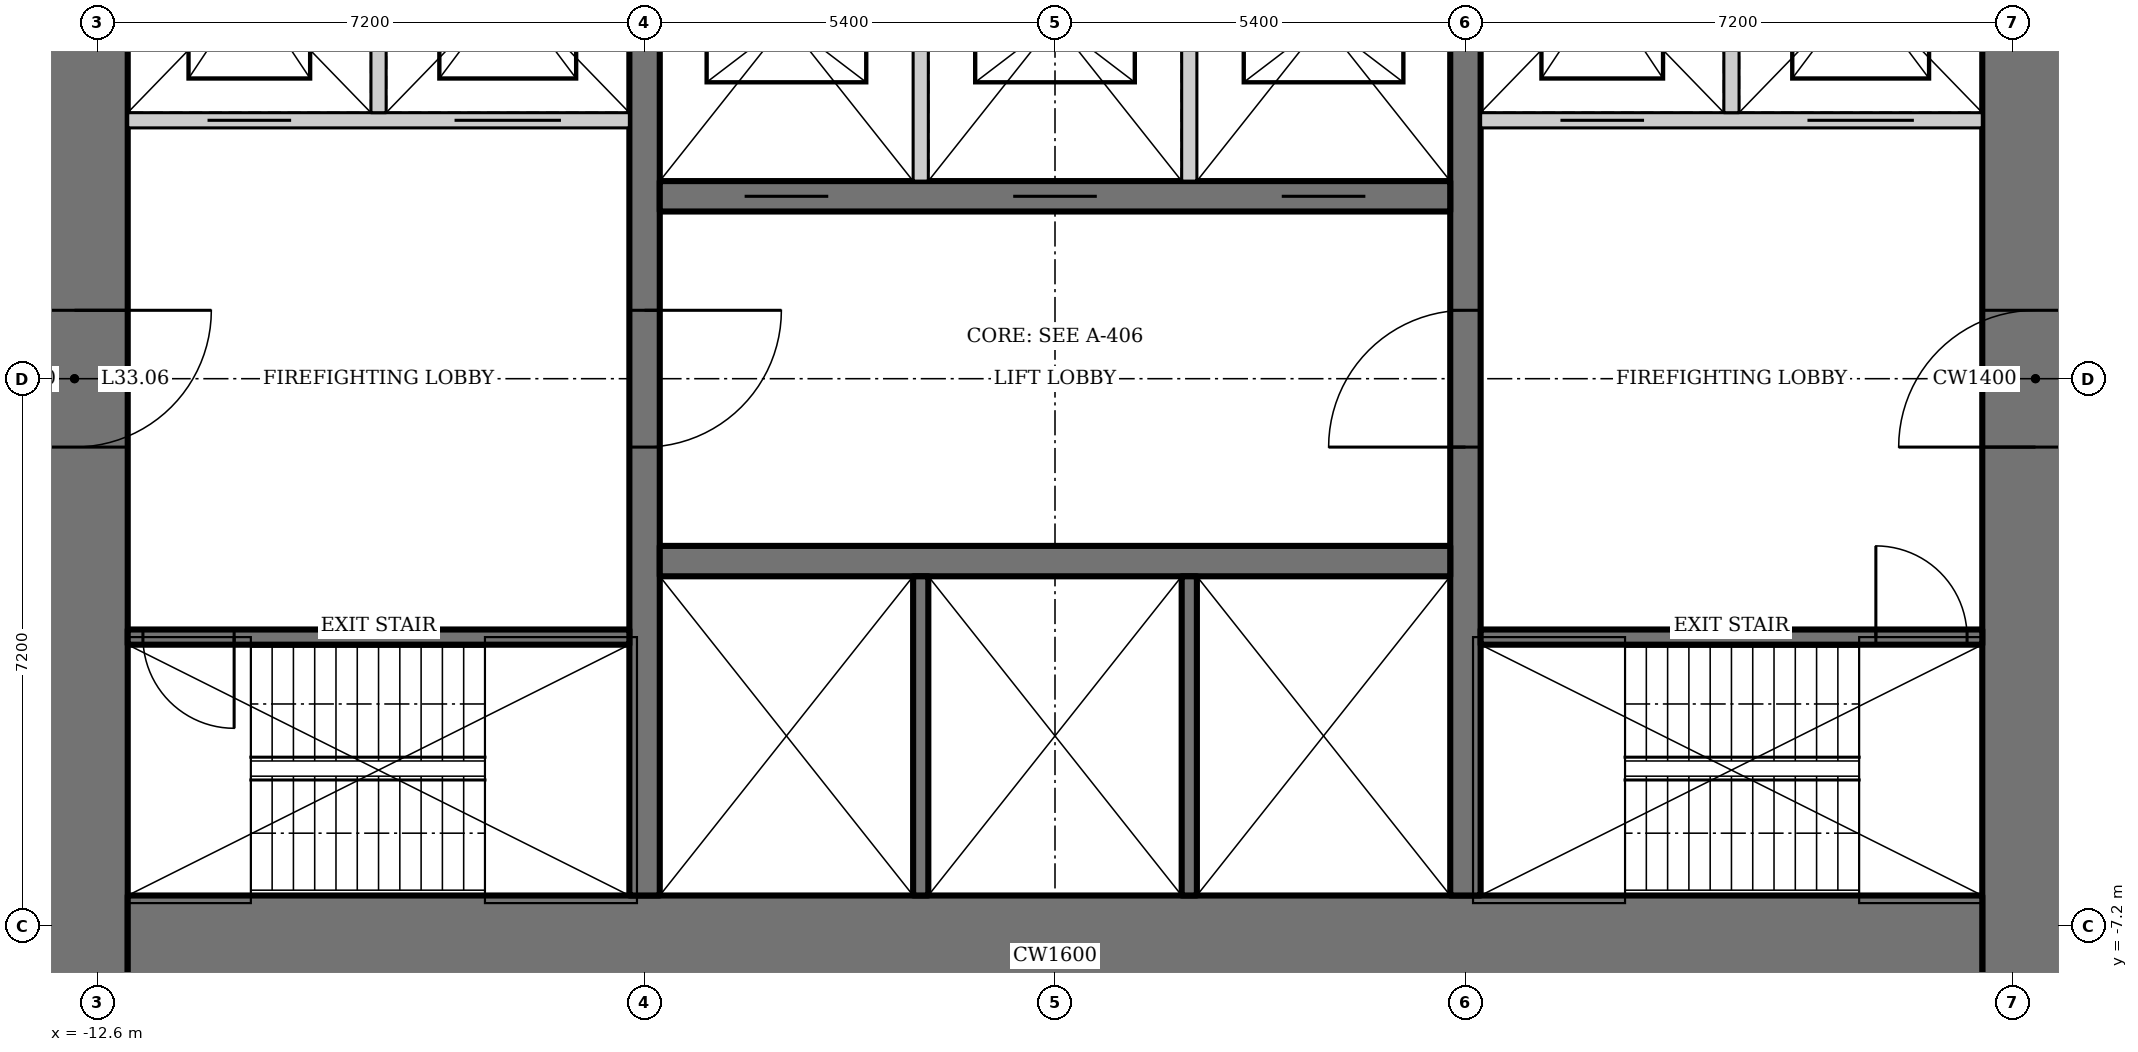
"""IFC4 building model, lengths in metres.
Left out: names, types, materials, properties, quantities, classifications, styles, units other than length and angle.
Written with IfcOpenShell. Run it as: python <this file> out.ifc"""

import sys

from ifc_helpers import new_model, si_unit, direction, frame, frame_2d, origin, place, context, subcontext, project, spatial, rectangle, extrude, element, fill, save


model = new_model("IFC4")
c1 = context("Model", 3, precision=1e-05, world=origin(), true_north=direction((0.0, 1.0)))
c2 = subcontext(c1, "Body", "Model", "MODEL_VIEW")
j1 = project(units=[si_unit("LENGTHUNIT", "METRE"), si_unit("PLANEANGLEUNIT", "RADIAN")], contexts=[c1])
p1 = place(None, origin())
s1 = spatial("IfcSite", under=j1, at=p1, CompositionType="ELEMENT")
p2 = place(p1, origin())
s2 = spatial("IfcBuilding", under=s1, at=p2, CompositionType="ELEMENT")
p3 = place(p2, frame((0.0, 0.0, 142.6)))
s3 = spatial("IfcBuildingStorey", under=s2, at=p3, CompositionType="ELEMENT", Elevation=142.6)
p4 = place(p3, frame((12.9, -13.0, 0.0), z_axis=(0.0, 0.0, 1.0), x_axis=(0.0, 1.0, 0.0)))
e1 = element("IfcWall", 1, at=p4, inside=s3, PredefinedType="SHEAR", context=c2, shape_type="SweptSolid", body=[
    extrude(rectangle(XDim=26.0, YDim=1.4, at=frame_2d((13.0, 0.0))), origin(), (0.0, 0.0, 1.0), 4.2),
])
p5 = place(p4, frame((12.1, 0.0, 0.0)))
e2 = element("IfcOpeningElement", 2, at=p5, cuts=e1, PredefinedType="OPENING", context=c2, shape_type="SweptSolid", body=[
    extrude(rectangle(XDim=1.8, YDim=2.1, at=frame_2d((0.9, 1.05))), frame((0.0, 0.71, 0.0), z_axis=(0.0, -1.0, 0.0), x_axis=(1.0, 0.0, 0.0)), (0.0, 0.0, 1.0), 1.42),
])
p6 = place(p3, frame((-12.9, 13.0, 0.0), z_axis=(0.0, 0.0, 1.0), x_axis=(0.0, -1.0, 0.0)))
e3 = element("IfcWall", 3, at=p6, inside=s3, PredefinedType="SHEAR", context=c2, shape_type="SweptSolid", body=[
    extrude(rectangle(XDim=26.0, YDim=1.4, at=frame_2d((13.0, 0.0))), origin(), (0.0, 0.0, 1.0), 4.2),
])
p7 = place(p6, frame((12.1, 0.0, 0.0)))
e4 = element("IfcOpeningElement", 4, at=p7, cuts=e3, PredefinedType="OPENING", context=c2, shape_type="SweptSolid", body=[
    extrude(rectangle(XDim=1.8, YDim=2.1, at=frame_2d((0.9, 1.05))), frame((0.0, 0.71, 0.0), z_axis=(0.0, -1.0, 0.0), x_axis=(1.0, 0.0, 0.0)), (0.0, 0.0, 1.0), 1.42),
])
p8 = place(p3, frame((-12.2, -7.6, 0.0), z_axis=(0.0, 0.0, 1.0), x_axis=(1.0, 0.0, 0.0)))
e5 = element("IfcWall", 5, at=p8, inside=s3, PredefinedType="SHEAR", context=c2, shape_type="SweptSolid", body=[
    extrude(rectangle(XDim=24.4, YDim=1.6, at=frame_2d((12.2, 0.0))), origin(), (0.0, 0.0, 1.0), 4.2),
])
p9 = place(p3, frame((5.4, -6.8, 0.0), z_axis=(0.0, 0.0, 1.0), x_axis=(0.0, 1.0, 0.0)))
e6 = element("IfcWall", 6, at=p9, inside=s3, PredefinedType="SHEAR", context=c2, shape_type="SweptSolid", body=[
    extrude(rectangle(XDim=13.6, YDim=0.4, at=frame_2d((6.8, 0.0))), origin(), (0.0, 0.0, 1.0), 4.2),
])
p10 = place(p9, frame((5.9, 0.0, 0.0)))
e7 = element("IfcOpeningElement", 7, at=p10, cuts=e6, PredefinedType="OPENING", context=c2, shape_type="SweptSolid", body=[
    extrude(rectangle(XDim=1.8, YDim=2.1, at=frame_2d((0.9, 1.05))), frame((0.0, 0.21, 0.0), z_axis=(0.0, -1.0, 0.0), x_axis=(1.0, 0.0, 0.0)), (0.0, 0.0, 1.0), 0.42),
])
p11 = place(p3, frame((-5.4, 6.8, 0.0), z_axis=(0.0, 0.0, 1.0), x_axis=(0.0, -1.0, 0.0)))
e8 = element("IfcWall", 8, at=p11, inside=s3, PredefinedType="SHEAR", context=c2, shape_type="SweptSolid", body=[
    extrude(rectangle(XDim=13.6, YDim=0.4, at=frame_2d((6.8, 0.0))), origin(), (0.0, 0.0, 1.0), 4.2),
])
p12 = place(p11, frame((5.9, 0.0, 0.0)))
e9 = element("IfcOpeningElement", 9, at=p12, cuts=e8, PredefinedType="OPENING", context=c2, shape_type="SweptSolid", body=[
    extrude(rectangle(XDim=1.8, YDim=2.1, at=frame_2d((0.9, 1.05))), frame((0.0, 0.21, 0.0), z_axis=(0.0, -1.0, 0.0), x_axis=(1.0, 0.0, 0.0)), (0.0, 0.0, 1.0), 0.42),
])
p13 = place(p3, frame((-5.2, -2.4, 0.0), z_axis=(0.0, 0.0, 1.0), x_axis=(1.0, 0.0, 0.0)))
e10 = element("IfcWall", 10, at=p13, inside=s3, PredefinedType="SHEAR", context=c2, shape_type="SweptSolid", body=[
    extrude(rectangle(XDim=10.4, YDim=0.4, at=frame_2d((5.2, 0.0))), origin(), (0.0, 0.0, 1.0), 4.2),
])
for number, where, z_axis, x_axis in (
    (11, (-1.767, -2.6, 0.0), (0.0, 0.0, 1.0), (0.0, -1.0, 0.0)),
    (12, (1.767, -2.6, 0.0), (0.0, 0.0, 1.0), (0.0, -1.0, 0.0)),
):
    element("IfcWall", number, at=place(p3, frame(where, z_axis=z_axis, x_axis=x_axis)), inside=s3, PredefinedType="SOLIDWALL", context=c2, shape_type="SweptSolid", body=[
        extrude(rectangle(XDim=4.2, YDim=0.2, at=frame_2d((2.1, 0.0))), origin(), (0.0, 0.0, 1.0), 4.2),
    ])
p14 = place(p3, frame((5.2, 2.4, 0.0), z_axis=(0.0, 0.0, 1.0), x_axis=(-1.0, 0.0, 0.0)))
e13 = element("IfcWall", 13, at=p14, inside=s3, PredefinedType="SHEAR", context=c2, shape_type="SweptSolid", body=[
    extrude(rectangle(XDim=10.4, YDim=0.4, at=frame_2d((5.2, 0.0))), origin(), (0.0, 0.0, 1.0), 4.2),
])
p15 = place(p14, frame((8.183, 0.0, 0.0)))
e14 = element("IfcOpeningElement", 14, at=p15, cuts=e13, PredefinedType="OPENING", context=c2, shape_type="SweptSolid", body=[
    extrude(rectangle(XDim=1.1, YDim=2.2, at=frame_2d((0.55, 1.1))), frame((0.0, 0.21, 0.0), z_axis=(0.0, -1.0, 0.0), x_axis=(1.0, 0.0, 0.0)), (0.0, 0.0, 1.0), 0.42),
])
p16 = place(p14, frame((4.65, 0.0, 0.0)))
e15 = element("IfcOpeningElement", 15, at=p16, cuts=e13, PredefinedType="OPENING", context=c2, shape_type="SweptSolid", body=[
    extrude(rectangle(XDim=1.1, YDim=2.2, at=frame_2d((0.55, 1.1))), frame((0.0, 0.21, 0.0), z_axis=(0.0, -1.0, 0.0), x_axis=(1.0, 0.0, 0.0)), (0.0, 0.0, 1.0), 0.42),
])
p17 = place(p14, frame((1.117, 0.0, 0.0)))
e16 = element("IfcOpeningElement", 16, at=p17, cuts=e13, PredefinedType="OPENING", context=c2, shape_type="SweptSolid", body=[
    extrude(rectangle(XDim=1.1, YDim=2.2, at=frame_2d((0.55, 1.1))), frame((0.0, 0.21, 0.0), z_axis=(0.0, -1.0, 0.0), x_axis=(1.0, 0.0, 0.0)), (0.0, 0.0, 1.0), 0.42),
])
for number, where, z_axis, x_axis in (
    (17, (-1.767, 2.6, 0.0), (0.0, 0.0, 1.0), (0.0, 1.0, 0.0)),
    (18, (1.767, 2.6, 0.0), (0.0, 0.0, 1.0), (0.0, 1.0, 0.0)),
):
    element("IfcWall", number, at=place(p3, frame(where, z_axis=z_axis, x_axis=x_axis)), inside=s3, PredefinedType="SOLIDWALL", context=c2, shape_type="SweptSolid", body=[
        extrude(rectangle(XDim=4.2, YDim=0.2, at=frame_2d((2.1, 0.0))), origin(), (0.0, 0.0, 1.0), 4.2),
    ])
p18 = place(p3, frame((5.6, -3.4, 0.0), z_axis=(0.0, 0.0, 1.0), x_axis=(1.0, 0.0, 0.0)))
e19 = element("IfcWall", 19, at=p18, inside=s3, PredefinedType="SHEAR", context=c2, shape_type="SweptSolid", body=[
    extrude(rectangle(XDim=6.6, YDim=0.2, at=frame_2d((3.3, 0.0))), origin(), (0.0, 0.0, 1.0), 4.2),
])
p19 = place(p18, frame((5.2, 0.0, 0.0)))
e20 = element("IfcOpeningElement", 20, at=p19, cuts=e19, PredefinedType="OPENING", context=c2, shape_type="SweptSolid", body=[
    extrude(rectangle(XDim=1.2, YDim=2.1, at=frame_2d((0.6, 1.05))), frame((0.0, 0.11, 0.0), z_axis=(0.0, -1.0, 0.0), x_axis=(1.0, 0.0, 0.0)), (0.0, 0.0, 1.0), 0.22),
])
p20 = place(p3, frame((12.2, 3.4, 0.0), z_axis=(0.0, 0.0, 1.0), x_axis=(-1.0, 0.0, 0.0)))
e21 = element("IfcWall", 21, at=p20, inside=s3, PredefinedType="SOLIDWALL", context=c2, shape_type="SweptSolid", body=[
    extrude(rectangle(XDim=6.6, YDim=0.2, at=frame_2d((3.3, 0.0))), origin(), (0.0, 0.0, 1.0), 4.2),
])
p21 = place(p20, frame((4.45, 0.0, 0.0)))
e22 = element("IfcOpeningElement", 22, at=p21, cuts=e21, PredefinedType="OPENING", context=c2, shape_type="SweptSolid", body=[
    extrude(rectangle(XDim=1.1, YDim=2.2, at=frame_2d((0.55, 1.1))), frame((0.0, 0.11, 0.0), z_axis=(0.0, -1.0, 0.0), x_axis=(1.0, 0.0, 0.0)), (0.0, 0.0, 1.0), 0.22),
])
p22 = place(p20, frame((0.9, 0.0, 0.0)))
e23 = element("IfcOpeningElement", 23, at=p22, cuts=e21, PredefinedType="OPENING", context=c2, shape_type="SweptSolid", body=[
    extrude(rectangle(XDim=1.4, YDim=2.2, at=frame_2d((0.7, 1.1))), frame((0.0, 0.11, 0.0), z_axis=(0.0, -1.0, 0.0), x_axis=(1.0, 0.0, 0.0)), (0.0, 0.0, 1.0), 0.22),
])
p23 = place(p3, frame((8.9, 3.5, 0.0), z_axis=(0.0, 0.0, 1.0), x_axis=(0.0, 1.0, 0.0)))
e24 = element("IfcWall", 24, at=p23, inside=s3, PredefinedType="SOLIDWALL", context=c2, shape_type="SweptSolid", body=[
    extrude(rectangle(XDim=3.3, YDim=0.2, at=frame_2d((1.65, 0.0))), origin(), (0.0, 0.0, 1.0), 4.2),
])
p24 = place(p3, frame((-5.6, -3.4, 0.0), z_axis=(0.0, 0.0, 1.0), x_axis=(-1.0, 0.0, 0.0)))
e25 = element("IfcWall", 25, at=p24, inside=s3, PredefinedType="SHEAR", context=c2, shape_type="SweptSolid", body=[
    extrude(rectangle(XDim=6.6, YDim=0.2, at=frame_2d((3.3, 0.0))), origin(), (0.0, 0.0, 1.0), 4.2),
])
p25 = place(p24, frame((5.2, 0.0, 0.0)))
e26 = element("IfcOpeningElement", 26, at=p25, cuts=e25, PredefinedType="OPENING", context=c2, shape_type="SweptSolid", body=[
    extrude(rectangle(XDim=1.2, YDim=2.1, at=frame_2d((0.6, 1.05))), frame((0.0, 0.11, 0.0), z_axis=(0.0, -1.0, 0.0), x_axis=(1.0, 0.0, 0.0)), (0.0, 0.0, 1.0), 0.22),
])
p26 = place(p3, frame((-12.2, 3.4, 0.0), z_axis=(0.0, 0.0, 1.0), x_axis=(1.0, 0.0, 0.0)))
e27 = element("IfcWall", 27, at=p26, inside=s3, PredefinedType="SOLIDWALL", context=c2, shape_type="SweptSolid", body=[
    extrude(rectangle(XDim=6.6, YDim=0.2, at=frame_2d((3.3, 0.0))), origin(), (0.0, 0.0, 1.0), 4.2),
])
p27 = place(p26, frame((1.05, 0.0, 0.0)))
e28 = element("IfcOpeningElement", 28, at=p27, cuts=e27, PredefinedType="OPENING", context=c2, shape_type="SweptSolid", body=[
    extrude(rectangle(XDim=1.1, YDim=2.2, at=frame_2d((0.55, 1.1))), frame((0.0, 0.11, 0.0), z_axis=(0.0, -1.0, 0.0), x_axis=(1.0, 0.0, 0.0)), (0.0, 0.0, 1.0), 0.22),
])
p28 = place(p26, frame((4.3, 0.0, 0.0)))
e29 = element("IfcOpeningElement", 29, at=p28, cuts=e27, PredefinedType="OPENING", context=c2, shape_type="SweptSolid", body=[
    extrude(rectangle(XDim=1.4, YDim=2.2, at=frame_2d((0.7, 1.1))), frame((0.0, 0.11, 0.0), z_axis=(0.0, -1.0, 0.0), x_axis=(1.0, 0.0, 0.0)), (0.0, 0.0, 1.0), 0.22),
])
p29 = place(p3, frame((-8.9, 3.5, 0.0), z_axis=(0.0, 0.0, 1.0), x_axis=(0.0, 1.0, 0.0)))
e30 = element("IfcWall", 30, at=p29, inside=s3, PredefinedType="SOLIDWALL", context=c2, shape_type="SweptSolid", body=[
    extrude(rectangle(XDim=3.3, YDim=0.2, at=frame_2d((1.65, 0.0))), origin(), (0.0, 0.0, 1.0), 4.2),
])
p30 = place(p10, origin())
e31 = element("IfcDoor", 31, at=p30, inside=s3, OperationType="DOUBLE_DOOR_DOUBLE_SWING", PredefinedType="DOOR", context=c2, shape_type="SweptSolid", body=[
    extrude(rectangle(XDim=1.8, YDim=2.1, at=frame_2d((0.9, 1.05))), frame((0.0, 0.025, 0.0), z_axis=(0.0, -1.0, 0.0), x_axis=(1.0, 0.0, 0.0)), (0.0, 0.0, 1.0), 0.05),
])
fill(e7, e31)
p31 = place(p12, origin())
e32 = element("IfcDoor", 32, at=p31, inside=s3, OperationType="DOUBLE_DOOR_DOUBLE_SWING", PredefinedType="DOOR", context=c2, shape_type="SweptSolid", body=[
    extrude(rectangle(XDim=1.8, YDim=2.1, at=frame_2d((0.9, 1.05))), frame((0.0, 0.025, 0.0), z_axis=(0.0, -1.0, 0.0), x_axis=(1.0, 0.0, 0.0)), (0.0, 0.0, 1.0), 0.05),
])
fill(e9, e32)
p32 = place(p19, origin())
e33 = element("IfcDoor", 33, at=p32, inside=s3, OperationType="SINGLE_SWING_RIGHT", PredefinedType="DOOR", context=c2, shape_type="SweptSolid", body=[
    extrude(rectangle(XDim=1.2, YDim=2.1, at=frame_2d((0.6, 1.05))), frame((0.0, 0.025, 0.0), z_axis=(0.0, -1.0, 0.0), x_axis=(1.0, 0.0, 0.0)), (0.0, 0.0, 1.0), 0.05),
])
fill(e20, e33)
p33 = place(p25, origin())
e34 = element("IfcDoor", 34, at=p33, inside=s3, OperationType="SINGLE_SWING_RIGHT", PredefinedType="DOOR", context=c2, shape_type="SweptSolid", body=[
    extrude(rectangle(XDim=1.2, YDim=2.1, at=frame_2d((0.6, 1.05))), frame((0.0, 0.025, 0.0), z_axis=(0.0, -1.0, 0.0), x_axis=(1.0, 0.0, 0.0)), (0.0, 0.0, 1.0), 0.05),
])
fill(e26, e34)
p34 = place(p5, origin())
e35 = element("IfcDoor", 35, at=p34, inside=s3, OperationType="DOUBLE_DOOR_DOUBLE_SWING", PredefinedType="DOOR", context=c2, shape_type="SweptSolid", body=[
    extrude(rectangle(XDim=1.8, YDim=2.1, at=frame_2d((0.9, 1.05))), frame((0.0, 0.025, 0.0), z_axis=(0.0, -1.0, 0.0), x_axis=(1.0, 0.0, 0.0)), (0.0, 0.0, 1.0), 0.05),
])
fill(e2, e35)
p35 = place(p7, origin())
e36 = element("IfcDoor", 36, at=p35, inside=s3, OperationType="DOUBLE_DOOR_DOUBLE_SWING", PredefinedType="DOOR", context=c2, shape_type="SweptSolid", body=[
    extrude(rectangle(XDim=1.8, YDim=2.1, at=frame_2d((0.9, 1.05))), frame((0.0, 0.025, 0.0), z_axis=(0.0, -1.0, 0.0), x_axis=(1.0, 0.0, 0.0)), (0.0, 0.0, 1.0), 0.05),
])
fill(e4, e36)
p36 = place(p15, origin())
e37 = element("IfcDoor", 37, at=p36, inside=s3, OperationType="DOUBLE_DOOR_SLIDING", PredefinedType="DOOR", context=c2, shape_type="SweptSolid", body=[
    extrude(rectangle(XDim=1.1, YDim=2.2, at=frame_2d((0.55, 1.1))), frame((0.0, 0.025, 0.0), z_axis=(0.0, -1.0, 0.0), x_axis=(1.0, 0.0, 0.0)), (0.0, 0.0, 1.0), 0.05),
])
fill(e14, e37)
p37 = place(p16, origin())
e38 = element("IfcDoor", 38, at=p37, inside=s3, OperationType="DOUBLE_DOOR_SLIDING", PredefinedType="DOOR", context=c2, shape_type="SweptSolid", body=[
    extrude(rectangle(XDim=1.1, YDim=2.2, at=frame_2d((0.55, 1.1))), frame((0.0, 0.025, 0.0), z_axis=(0.0, -1.0, 0.0), x_axis=(1.0, 0.0, 0.0)), (0.0, 0.0, 1.0), 0.05),
])
fill(e15, e38)
p38 = place(p17, origin())
e39 = element("IfcDoor", 39, at=p38, inside=s3, OperationType="DOUBLE_DOOR_SLIDING", PredefinedType="DOOR", context=c2, shape_type="SweptSolid", body=[
    extrude(rectangle(XDim=1.1, YDim=2.2, at=frame_2d((0.55, 1.1))), frame((0.0, 0.025, 0.0), z_axis=(0.0, -1.0, 0.0), x_axis=(1.0, 0.0, 0.0)), (0.0, 0.0, 1.0), 0.05),
])
fill(e16, e39)
p39 = place(p27, origin())
e40 = element("IfcDoor", 40, at=p39, inside=s3, OperationType="DOUBLE_DOOR_SLIDING", PredefinedType="DOOR", context=c2, shape_type="SweptSolid", body=[
    extrude(rectangle(XDim=1.1, YDim=2.2, at=frame_2d((0.55, 1.1))), frame((0.0, 0.025, 0.0), z_axis=(0.0, -1.0, 0.0), x_axis=(1.0, 0.0, 0.0)), (0.0, 0.0, 1.0), 0.05),
])
fill(e28, e40)
p40 = place(p28, origin())
e41 = element("IfcDoor", 41, at=p40, inside=s3, OperationType="DOUBLE_DOOR_SLIDING", PredefinedType="DOOR", context=c2, shape_type="SweptSolid", body=[
    extrude(rectangle(XDim=1.4, YDim=2.2, at=frame_2d((0.7, 1.1))), frame((0.0, 0.025, 0.0), z_axis=(0.0, -1.0, 0.0), x_axis=(1.0, 0.0, 0.0)), (0.0, 0.0, 1.0), 0.05),
])
fill(e29, e41)
p41 = place(p21, origin())
e42 = element("IfcDoor", 42, at=p41, inside=s3, OperationType="DOUBLE_DOOR_SLIDING", PredefinedType="DOOR", context=c2, shape_type="SweptSolid", body=[
    extrude(rectangle(XDim=1.1, YDim=2.2, at=frame_2d((0.55, 1.1))), frame((0.0, 0.025, 0.0), z_axis=(0.0, -1.0, 0.0), x_axis=(1.0, 0.0, 0.0)), (0.0, 0.0, 1.0), 0.05),
])
fill(e22, e42)
p42 = place(p22, origin())
e43 = element("IfcDoor", 43, at=p42, inside=s3, OperationType="DOUBLE_DOOR_SLIDING", PredefinedType="DOOR", context=c2, shape_type="SweptSolid", body=[
    extrude(rectangle(XDim=1.4, YDim=2.2, at=frame_2d((0.7, 1.1))), frame((0.0, 0.025, 0.0), z_axis=(0.0, -1.0, 0.0), x_axis=(1.0, 0.0, 0.0)), (0.0, 0.0, 1.0), 0.05),
])
fill(e23, e43)
save(model, sys.argv[1])
